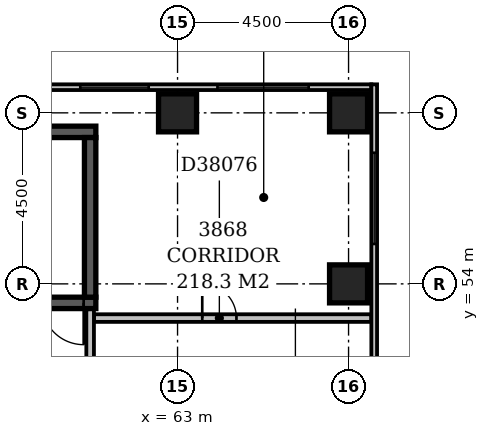
"""IFC4 building model, lengths in metres.
Left out: names, types, materials, properties, quantities, classifications, styles, units other than length and angle.
Written with IfcOpenShell. Run it as: python <this file> out.ifc"""

import sys

from ifc_helpers import new_model, si_unit, direction, frame, frame_2d, origin, origin_2d, place, context, subcontext, project, spatial, rectangle, extrude, element, fill, save


model = new_model("IFC4")
c1 = context("Model", 3, precision=1e-05, world=origin(), true_north=direction((0.0, 1.0)))
c2 = subcontext(c1, "Body", "Model", "MODEL_VIEW")
j1 = project(units=[si_unit("LENGTHUNIT", "METRE"), si_unit("PLANEANGLEUNIT", "RADIAN")], contexts=[c1])
p1 = place(None, origin())
s1 = spatial("IfcSite", under=j1, at=p1, CompositionType="ELEMENT")
p2 = place(p1, origin())
s2 = spatial("IfcBuilding", under=s1, at=p2, CompositionType="ELEMENT")
p3 = place(p2, frame((0.0, 0.0, 152.0)))
s3 = spatial("IfcBuildingStorey", under=s2, at=p3, CompositionType="ELEMENT", Elevation=152.0)
p4 = place(p3, frame((53.85, 53.5, -0.3), z_axis=(0.0, 0.0, 1.0), x_axis=(1.0, 0.0, 0.0)))
e1 = element("IfcWall", 1, at=p4, inside=s3, PredefinedType="SHEAR", context=c2, shape_type="SweptSolid", body=[
    extrude(rectangle(XDim=7.0, YDim=0.3, at=frame_2d((3.5, 0.0))), origin(), (0.0, 0.0, 1.0), 3.6),
])
p5 = place(p4, frame((5.58, 0.0, 0.3)))
e2 = element("IfcOpeningElement", 2, at=p5, cuts=e1, PredefinedType="OPENING", context=c2, shape_type="SweptSolid", body=[
    extrude(rectangle(XDim=1.1, YDim=2.1, at=frame_2d((0.55, 1.05))), frame((0.0, 0.162, 0.0), z_axis=(0.0, -1.0, 0.0), x_axis=(1.0, 0.0, 0.0)), (0.0, 0.0, 1.0), 0.324),
])
p6 = place(p3, frame((53.85, 58.0, -0.3), z_axis=(0.0, 0.0, 1.0), x_axis=(1.0, 0.0, 0.0)))
e3 = element("IfcWall", 3, at=p6, inside=s3, PredefinedType="SHEAR", context=c2, shape_type="SweptSolid", body=[
    extrude(rectangle(XDim=7.0, YDim=0.3, at=frame_2d((3.5, 0.0))), origin(), (0.0, 0.0, 1.0), 3.6),
])
p7 = place(p3, frame((60.7, 53.65, -0.3), z_axis=(0.0, 0.0, 1.0), x_axis=(0.0, 1.0, 0.0)))
e4 = element("IfcWall", 4, at=p7, inside=s3, PredefinedType="SHEAR", context=c2, shape_type="SweptSolid", body=[
    extrude(rectangle(XDim=4.2, YDim=0.3, at=frame_2d((2.1, 0.0))), origin(), (0.0, 0.0, 1.0), 3.6),
])
for number, where, z_axis, x_axis in (
    (5, (67.5, 54.0, -0.3), (0.0, 0.0, 1.0), (1.0, 0.0, 0.0)),
    (6, (63.0, 58.5, -0.3), (0.0, 0.0, 1.0), (1.0, 0.0, 0.0)),
    (7, (67.5, 58.5, -0.3), (0.0, 0.0, 1.0), (1.0, 0.0, 0.0)),
):
    element("IfcColumn", number, at=place(p3, frame(where, z_axis=z_axis, x_axis=x_axis)), inside=s3, PredefinedType="COLUMN", context=c2, shape_type="SweptSolid", body=[
        extrude(rectangle(XDim=1.0, YDim=1.0, at=origin_2d()), origin(), (0.0, 0.0, 1.0), 3.6),
    ])
p8 = place(p3, frame((68.175, 35.4, 0.0), z_axis=(0.0, 0.0, 1.0), x_axis=(0.0, 1.0, 0.0)))
e8 = element("IfcWall", 8, at=p8, inside=s3, PredefinedType="STANDARD", context=c2, shape_type="SweptSolid", body=[
    extrude(rectangle(XDim=23.85, YDim=0.15, at=frame_2d((11.925, 0.0))), origin(), (0.0, 0.0, 1.0), 2.7),
])
p9 = place(p8, frame((1.65, 0.0, 0.6)))
e9 = element("IfcOpeningElement", 9, at=p9, cuts=e8, PredefinedType="OPENING", context=c2, shape_type="SweptSolid", body=[
    extrude(rectangle(XDim=2.4, YDim=1.8, at=frame_2d((1.2, 0.9))), frame((0.0, 0.087, 0.0), z_axis=(0.0, -1.0, 0.0), x_axis=(1.0, 0.0, 0.0)), (0.0, 0.0, 1.0), 0.174),
])
p10 = place(p8, frame((10.65, 0.0, 0.6)))
e10 = element("IfcOpeningElement", 10, at=p10, cuts=e8, PredefinedType="OPENING", context=c2, shape_type="SweptSolid", body=[
    extrude(rectangle(XDim=2.4, YDim=1.8, at=frame_2d((1.2, 0.9))), frame((0.0, 0.087, 0.0), z_axis=(0.0, -1.0, 0.0), x_axis=(1.0, 0.0, 0.0)), (0.0, 0.0, 1.0), 0.174),
])
p11 = place(p8, frame((19.65, 0.0, 0.6)))
e11 = element("IfcOpeningElement", 11, at=p11, cuts=e8, PredefinedType="OPENING", context=c2, shape_type="SweptSolid", body=[
    extrude(rectangle(XDim=2.4, YDim=1.8, at=frame_2d((1.2, 0.9))), frame((0.0, 0.087, 0.0), z_axis=(0.0, -1.0, 0.0), x_axis=(1.0, 0.0, 0.0)), (0.0, 0.0, 1.0), 0.174),
])
p12 = place(p3, frame((68.1, 59.175, 0.0), z_axis=(0.0, 0.0, 1.0), x_axis=(-1.0, 0.0, 0.0)))
e12 = element("IfcWall", 12, at=p12, inside=s3, PredefinedType="STANDARD", context=c2, shape_type="SweptSolid", body=[
    extrude(rectangle(XDim=68.85, YDim=0.15, at=frame_2d((34.425, 0.0))), origin(), (0.0, 0.0, 1.0), 2.7),
])
p13 = place(p12, frame((1.65, 0.0, 0.6)))
e13 = element("IfcOpeningElement", 13, at=p13, cuts=e12, PredefinedType="OPENING", context=c2, shape_type="SweptSolid", body=[
    extrude(rectangle(XDim=2.4, YDim=1.8, at=frame_2d((1.2, 0.9))), frame((0.0, 0.087, 0.0), z_axis=(0.0, -1.0, 0.0), x_axis=(1.0, 0.0, 0.0)), (0.0, 0.0, 1.0), 0.174),
])
p14 = place(p12, frame((5.86, 0.0, 0.6)))
e14 = element("IfcOpeningElement", 14, at=p14, cuts=e12, PredefinedType="OPENING", context=c2, shape_type="SweptSolid", body=[
    extrude(rectangle(XDim=1.8, YDim=1.8, at=frame_2d((0.9, 0.9))), frame((0.0, 0.087, 0.0), z_axis=(0.0, -1.0, 0.0), x_axis=(1.0, 0.0, 0.0)), (0.0, 0.0, 1.0), 0.174),
])
p15 = place(p12, frame((15.15, 0.0, 0.6)))
e15 = element("IfcOpeningElement", 15, at=p15, cuts=e12, PredefinedType="OPENING", context=c2, shape_type="SweptSolid", body=[
    extrude(rectangle(XDim=2.4, YDim=1.8, at=frame_2d((1.2, 0.9))), frame((0.0, 0.087, 0.0), z_axis=(0.0, -1.0, 0.0), x_axis=(1.0, 0.0, 0.0)), (0.0, 0.0, 1.0), 0.174),
])
p16 = place(p3, frame((60.7, 51.6, 0.0), z_axis=(0.0, 0.0, 1.0), x_axis=(0.0, 1.0, 0.0)))
e16 = element("IfcWall", 16, at=p16, inside=s3, PredefinedType="PARTITIONING", context=c2, shape_type="SweptSolid", body=[
    extrude(rectangle(XDim=1.73, YDim=0.2, at=frame_2d((0.865, 0.0))), origin(), (0.0, 0.0, 1.0), 3.3),
])
p17 = place(p3, frame((60.8, 53.1, 0.0), z_axis=(0.0, 0.0, 1.0), x_axis=(1.0, 0.0, 0.0)))
e17 = element("IfcWall", 17, at=p17, inside=s3, PredefinedType="PARTITIONING", context=c2, shape_type="SweptSolid", body=[
    extrude(rectangle(XDim=7.3, YDim=0.2, at=frame_2d((3.65, 0.0))), origin(), (0.0, 0.0, 1.0), 3.3),
])
p18 = place(p17, frame((2.85, 0.0, 0.0)))
e18 = element("IfcOpeningElement", 18, at=p18, cuts=e17, PredefinedType="OPENING", context=c2, shape_type="SweptSolid", body=[
    extrude(rectangle(XDim=0.9, YDim=2.1, at=frame_2d((0.45, 1.05))), frame((0.0, 0.112, 0.0), z_axis=(0.0, -1.0, 0.0), x_axis=(1.0, 0.0, 0.0)), (0.0, 0.0, 1.0), 0.224),
])
p19 = place(p11, origin())
e19 = element("IfcWindow", 19, at=p19, inside=s3, PartitioningType="SINGLE_PANEL", PredefinedType="WINDOW", context=c2, shape_type="SweptSolid", body=[
    extrude(rectangle(XDim=2.4, YDim=1.8, at=frame_2d((1.2, 0.9))), frame((0.0, 0.03, 0.0), z_axis=(0.0, -1.0, 0.0), x_axis=(1.0, 0.0, 0.0)), (0.0, 0.0, 1.0), 0.06),
])
fill(e11, e19)
p20 = place(p13, origin())
e20 = element("IfcWindow", 20, at=p20, inside=s3, PartitioningType="SINGLE_PANEL", PredefinedType="WINDOW", context=c2, shape_type="SweptSolid", body=[
    extrude(rectangle(XDim=2.4, YDim=1.8, at=frame_2d((1.2, 0.9))), frame((0.0, 0.03, 0.0), z_axis=(0.0, -1.0, 0.0), x_axis=(1.0, 0.0, 0.0)), (0.0, 0.0, 1.0), 0.06),
])
fill(e13, e20)
p21 = place(p14, origin())
e21 = element("IfcWindow", 21, at=p21, inside=s3, PartitioningType="SINGLE_PANEL", PredefinedType="WINDOW", context=c2, shape_type="SweptSolid", body=[
    extrude(rectangle(XDim=1.8, YDim=1.8, at=frame_2d((0.9, 0.9))), frame((0.0, 0.03, 0.0), z_axis=(0.0, -1.0, 0.0), x_axis=(1.0, 0.0, 0.0)), (0.0, 0.0, 1.0), 0.06),
])
fill(e14, e21)
p22 = place(p5, origin())
e22 = element("IfcDoor", 22, at=p22, inside=s3, OperationType="SINGLE_SWING_RIGHT", PredefinedType="DOOR", context=c2, shape_type="SweptSolid", body=[
    extrude(rectangle(XDim=1.1, YDim=2.1, at=frame_2d((0.55, 1.05))), frame((0.0, 0.025, 0.0), z_axis=(0.0, -1.0, 0.0), x_axis=(1.0, 0.0, 0.0)), (0.0, 0.0, 1.0), 0.05),
])
fill(e2, e22)
p23 = place(p18, origin())
e23 = element("IfcDoor", 23, at=p23, inside=s3, OperationType="SINGLE_SWING_LEFT", PredefinedType="DOOR", context=c2, shape_type="SweptSolid", body=[
    extrude(rectangle(XDim=0.9, YDim=2.1, at=frame_2d((0.45, 1.05))), frame((0.0, 0.025, 0.0), z_axis=(0.0, -1.0, 0.0), x_axis=(1.0, 0.0, 0.0)), (0.0, 0.0, 1.0), 0.05),
])
fill(e18, e23)
save(model, sys.argv[1])
